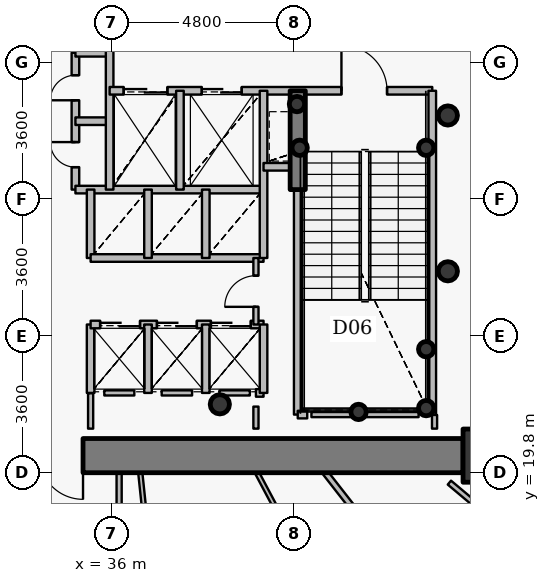
"""IFC4 building model, lengths in metres.
Left out: names, types, materials, properties, quantities, classifications, styles, units other than length and angle.
Written with IfcOpenShell. Run it as: python <this file> out.ifc"""

import sys

from ifc_helpers import new_model, si_unit, direction, frame, frame_2d, origin, origin_2d, place, context, subcontext, project, spatial, rectangle, hollow_circle, extrude, source, transform, mapped, element, fill, save


model = new_model("IFC4")
c1 = context("Model", 3, precision=1e-05, world=origin(), true_north=direction((0.0, 1.0)))
c2 = subcontext(c1, "Body", "Model", "MODEL_VIEW")
j1 = project(units=[si_unit("LENGTHUNIT", "METRE"), si_unit("PLANEANGLEUNIT", "RADIAN")], contexts=[c1])
p1 = place(None, origin())
s1 = spatial("IfcSite", under=j1, at=p1, CompositionType="ELEMENT")
p2 = place(p1, origin())
s2 = spatial("IfcBuilding", under=s1, at=p2, CompositionType="ELEMENT")
p3 = place(p2, frame((0.0, 0.0, 57.6)))
s3 = spatial("IfcBuildingStorey", under=s2, at=p3, CompositionType="ELEMENT", Elevation=57.6)
p4 = place(p3, frame((45.95, 20.25, 0.0), z_axis=(0.0, 0.0, 1.0), x_axis=(1.0, 0.0, 0.0)))
e1 = element("IfcColumn", 1, at=p4, inside=s3, PredefinedType="COLUMN", context=c2, shape_type="SweptSolid", body=[
    extrude(rectangle(XDim=1.4, YDim=1.4, at=origin_2d()), origin(), (0.0, 0.0, 1.0), 4.2),
])
p5 = place(p3, frame((38.85, 21.6, 0.0), z_axis=(0.0, 0.0, 1.0), x_axis=(1.0, 0.0, 0.0)))
e2 = element("IfcColumn", 2, at=p5, inside=s3, PredefinedType="COLUMN", context=c2, shape_type="SweptSolid", body=[
    extrude(hollow_circle(Radius=0.254, WallThickness=0.02, at=origin_2d()), origin(), (0.0, 0.0, 1.0), 4.2),
])
for number, where, z_axis, x_axis in (
    (3, (44.28, 21.5, 0.0), (0.0, 0.0, 1.0), (1.0, 0.0, 0.0)),
    (4, (44.28, 23.05, 0.0), (0.0, 0.0, 1.0), (1.0, 0.0, 0.0)),
    (5, (42.5, 21.4, 0.0), (0.0, 0.0, 1.0), (1.0, 0.0, 0.0)),
    (6, (40.95, 28.35, 0.0), (0.0, 0.0, 1.0), (1.0, 0.0, 0.0)),
    (7, (44.28, 28.35, 0.0), (0.0, 0.0, 1.0), (1.0, 0.0, 0.0)),
    (8, (40.88, 29.5, 0.0), (0.0, 0.0, 1.0), (1.0, 0.0, 0.0)),
):
    element("IfcColumn", number, at=place(p3, frame(where, z_axis=z_axis, x_axis=x_axis)), inside=s3, PredefinedType="COLUMN", context=c2, shape_type="SweptSolid", body=[
        extrude(hollow_circle(Radius=0.203, WallThickness=0.016, at=origin_2d()), origin(), (0.0, 0.0, 1.0), 4.2),
    ])
p6 = place(p3, frame((45.25, 20.25, 0.0), z_axis=(0.0, 0.0, 1.0), x_axis=(-1.0, 0.0, 0.0)))
e9 = element("IfcWall", 9, at=p6, inside=s3, PredefinedType="SHEAR", context=c2, shape_type="SweptSolid", body=[
    extrude(rectangle(XDim=18.5, YDim=0.9, at=frame_2d((9.25, 0.0))), origin(), (0.0, 0.0, 1.0), 3.4),
])
p7 = place(p6, frame((10.0, 0.0, 0.0)))
e10 = element("IfcOpeningElement", 10, at=p7, cuts=e9, PredefinedType="OPENING", context=c2, shape_type="SweptSolid", body=[
    extrude(rectangle(XDim=1.15, YDim=2.15, at=origin_2d()), frame((0.575, 0.46, 1.075), z_axis=(0.0, -1.0, 0.0), x_axis=(1.0, 0.0, 0.0)), (0.0, 0.0, 1.0), 0.92),
])
p8 = place(p3, frame((40.9, 27.25, 0.0), z_axis=(0.0, 0.0, 1.0), x_axis=(0.0, 1.0, 0.0)))
e11 = element("IfcWall", 11, at=p8, inside=s3, PredefinedType="SHEAR", context=c2, shape_type="SweptSolid", body=[
    extrude(rectangle(XDim=2.6, YDim=0.4, at=frame_2d((1.3, 0.0))), origin(), (0.0, 0.0, 1.0), 3.55),
])
for number, where, z_axis, x_axis in (
    (12, (44.85, 25.1, 0.0), (0.0, 0.0, 1.0), (1.0, 0.0, 0.0)),
    (13, (44.85, 29.2, 0.0), (0.0, 0.0, 1.0), (1.0, 0.0, 0.0)),
):
    element("IfcColumn", number, at=place(p3, frame(where, z_axis=z_axis, x_axis=x_axis)), inside=s3, PredefinedType="COLUMN", context=c2, shape_type="SweptSolid", body=[
        extrude(hollow_circle(Radius=0.254, WallThickness=0.02, at=origin_2d()), origin(), (0.0, 0.0, 1.0), 4.2),
    ])
p9 = place(p3, frame((35.05, 27.25, 0.0), z_axis=(0.0, 0.0, 1.0), x_axis=(0.0, 1.0, 0.0)))
e14 = element("IfcWall", 14, at=p9, inside=s3, PredefinedType="PARTITIONING", context=c2, shape_type="SweptSolid", body=[
    extrude(rectangle(XDim=3.6, YDim=0.2, at=frame_2d((1.8, 0.0))), origin(), (0.0, 0.0, 1.0), 3.95),
])
p10 = place(p9, frame((0.59, 0.0, 0.0)))
e15 = element("IfcOpeningElement", 15, at=p10, cuts=e14, PredefinedType="OPENING", context=c2, shape_type="SweptSolid", body=[
    extrude(rectangle(XDim=0.66, YDim=2.05, at=origin_2d()), frame((0.33, 0.11, 1.025), z_axis=(0.0, -1.0, 0.0), x_axis=(1.0, 0.0, 0.0)), (0.0, 0.0, 1.0), 0.22),
])
p11 = place(p9, frame((2.35, 0.0, 0.0)))
e16 = element("IfcOpeningElement", 16, at=p11, cuts=e14, PredefinedType="OPENING", context=c2, shape_type="SweptSolid", body=[
    extrude(rectangle(XDim=0.66, YDim=2.05, at=origin_2d()), frame((0.33, 0.11, 1.025), z_axis=(0.0, -1.0, 0.0), x_axis=(1.0, 0.0, 0.0)), (0.0, 0.0, 1.0), 0.22),
])
p12 = place(p3, frame((35.05, 27.25, 0.0), z_axis=(0.0, 0.0, 1.0), x_axis=(1.0, 0.0, 0.0)))
e17 = element("IfcWall", 17, at=p12, inside=s3, PredefinedType="PARTITIONING", context=c2, shape_type="SweptSolid", body=[
    extrude(rectangle(XDim=4.95, YDim=0.2, at=frame_2d((2.475, 0.0))), origin(), (0.0, 0.0, 1.0), 3.535),
])
for number, where, z_axis, x_axis in (
    (18, (35.05, 29.05, 0.0), (0.0, 0.0, 1.0), (1.0, 0.0, 0.0)),
    (19, (35.05, 30.85, 0.0), (0.0, 0.0, 1.0), (1.0, 0.0, 0.0)),
):
    element("IfcWall", number, at=place(p3, frame(where, z_axis=z_axis, x_axis=x_axis)), inside=s3, PredefinedType="PARTITIONING", context=c2, shape_type="SweptSolid", body=[
        extrude(rectangle(XDim=0.9, YDim=0.2, at=frame_2d((0.45, 0.0))), origin(), (0.0, 0.0, 1.0), 3.95),
    ])
p13 = place(p3, frame((35.45, 21.9, 0.0), z_axis=(0.0, 0.0, 1.0), x_axis=(0.0, 1.0, 0.0)))
e20 = element("IfcWall", 20, at=p13, inside=s3, PredefinedType="PARTITIONING", context=c2, shape_type="SweptSolid", body=[
    extrude(rectangle(XDim=1.8, YDim=0.2, at=frame_2d((0.9, 0.0))), origin(), (0.0, 0.0, 1.0), 3.95),
])
p14 = place(p3, frame((35.45, 23.7, 0.0), z_axis=(0.0, 0.0, 1.0), x_axis=(1.0, 0.0, 0.0)))
e21 = element("IfcWall", 21, at=p14, inside=s3, PredefinedType="PARTITIONING", context=c2, shape_type="SweptSolid", body=[
    extrude(rectangle(XDim=4.55, YDim=0.2, at=frame_2d((2.275, 0.0))), origin(), (0.0, 0.0, 1.0), 3.535),
])
p15 = place(p14, frame((0.25, 0.0, 0.0)))
e22 = element("IfcOpeningElement", 22, at=p15, cuts=e21, PredefinedType="OPENING", context=c2, shape_type="SweptSolid", body=[
    extrude(rectangle(XDim=1.05, YDim=2.15, at=origin_2d()), frame((0.525, 0.11, 1.075), z_axis=(0.0, -1.0, 0.0), x_axis=(1.0, 0.0, 0.0)), (0.0, 0.0, 1.0), 0.22),
])
p16 = place(p14, frame((1.745, 0.0, 0.0)))
e23 = element("IfcOpeningElement", 23, at=p16, cuts=e21, PredefinedType="OPENING", context=c2, shape_type="SweptSolid", body=[
    extrude(rectangle(XDim=1.05, YDim=2.15, at=origin_2d()), frame((0.525, 0.11, 1.075), z_axis=(0.0, -1.0, 0.0), x_axis=(1.0, 0.0, 0.0)), (0.0, 0.0, 1.0), 0.22),
])
p17 = place(p14, frame((3.165, 0.0, 0.0)))
e24 = element("IfcOpeningElement", 24, at=p17, cuts=e21, PredefinedType="OPENING", context=c2, shape_type="SweptSolid", body=[
    extrude(rectangle(XDim=1.05, YDim=2.15, at=origin_2d()), frame((0.525, 0.11, 1.075), z_axis=(0.0, -1.0, 0.0), x_axis=(1.0, 0.0, 0.0)), (0.0, 0.0, 1.0), 0.22),
])
p18 = place(p3, frame((35.45, 25.45, 0.0), z_axis=(0.0, 0.0, 1.0), x_axis=(0.0, 1.0, 0.0)))
e25 = element("IfcWall", 25, at=p18, inside=s3, PredefinedType="PARTITIONING", context=c2, shape_type="SweptSolid", body=[
    extrude(rectangle(XDim=1.8, YDim=0.2, at=frame_2d((0.9, 0.0))), origin(), (0.0, 0.0, 1.0), 3.95),
])
p19 = place(p3, frame((35.45, 25.45, 0.0), z_axis=(0.0, 0.0, 1.0), x_axis=(1.0, 0.0, 0.0)))
e26 = element("IfcWall", 26, at=p19, inside=s3, PredefinedType="PARTITIONING", context=c2, shape_type="SweptSolid", body=[
    extrude(rectangle(XDim=4.55, YDim=0.2, at=frame_2d((2.275, 0.0))), origin(), (0.0, 0.0, 1.0), 3.535),
])
p20 = place(p3, frame((35.95, 27.25, 0.0), z_axis=(0.0, 0.0, 1.0), x_axis=(0.0, 1.0, 0.0)))
e27 = element("IfcWall", 27, at=p20, inside=s3, PredefinedType="PARTITIONING", context=c2, shape_type="SweptSolid", body=[
    extrude(rectangle(XDim=3.8, YDim=0.2, at=frame_2d((1.9, 0.0))), origin(), (0.0, 0.0, 1.0), 3.95),
])
p21 = place(p3, frame((35.95, 29.85, 0.0), z_axis=(0.0, 0.0, 1.0), x_axis=(1.0, 0.0, 0.0)))
e28 = element("IfcWall", 28, at=p21, inside=s3, PredefinedType="PARTITIONING", context=c2, shape_type="SweptSolid", body=[
    extrude(rectangle(XDim=8.49, YDim=0.2, at=frame_2d((4.245, 0.0))), origin(), (0.0, 0.0, 1.0), 3.535),
])
p22 = place(p21, frame((6.1, 0.0, 0.0)))
e29 = element("IfcOpeningElement", 29, at=p22, cuts=e28, PredefinedType="OPENING", context=c2, shape_type="SweptSolid", body=[
    extrude(rectangle(XDim=1.2, YDim=2.15, at=origin_2d()), frame((0.6, 0.11, 1.075), z_axis=(0.0, -1.0, 0.0), x_axis=(1.0, 0.0, 0.0)), (0.0, 0.0, 1.0), 0.22),
])
p23 = place(p21, frame((0.37, 0.0, 0.0)))
e30 = element("IfcOpeningElement", 30, at=p23, cuts=e28, PredefinedType="OPENING", context=c2, shape_type="SweptSolid", body=[
    extrude(rectangle(XDim=1.15, YDim=2.15, at=origin_2d()), frame((0.575, 0.11, 1.075), z_axis=(0.0, -1.0, 0.0), x_axis=(1.0, 0.0, 0.0)), (0.0, 0.0, 1.0), 0.22),
])
p24 = place(p21, frame((2.425, 0.0, 0.0)))
e31 = element("IfcOpeningElement", 31, at=p24, cuts=e28, PredefinedType="OPENING", context=c2, shape_type="SweptSolid", body=[
    extrude(rectangle(XDim=1.05, YDim=2.15, at=origin_2d()), frame((0.525, 0.11, 1.075), z_axis=(0.0, -1.0, 0.0), x_axis=(1.0, 0.0, 0.0)), (0.0, 0.0, 1.0), 0.22),
])
p25 = place(p3, frame((36.2, 17.9, 0.0), z_axis=(0.0, 0.0, 1.0), x_axis=(0.0, 1.0, 0.0)))
e32 = element("IfcWall", 32, at=p25, inside=s3, PredefinedType="PARTITIONING", context=c2, shape_type="SweptSolid", body=[
    extrude(rectangle(XDim=1.9, YDim=0.135, at=frame_2d((0.95, 0.0))), origin(), (0.0, 0.0, 1.0), 3.285),
])
p26 = place(p3, frame((36.757, 19.8, 0.0), z_axis=(0.0, 0.0, 1.0), x_axis=(0.10451927992, -0.994522860534, 0.0)))
e33 = element("IfcWall", 33, at=p26, inside=s3, PredefinedType="MOVABLE", context=c2, shape_type="SweptSolid", body=[
    extrude(rectangle(XDim=17.047, YDim=0.11, at=frame_2d((8.523, 0.0))), origin(), (0.0, 0.0, 1.0), 3.335),
])
p27 = place(p26, frame((7.999, 0.0, 0.0)))
e34 = element("IfcOpeningElement", 34, at=p27, cuts=e33, PredefinedType="OPENING", context=c2, shape_type="SweptSolid", body=[
    extrude(rectangle(XDim=1.05, YDim=2.15, at=origin_2d()), frame((0.525, 0.065, 1.075), z_axis=(0.0, -1.0, 0.0), x_axis=(1.0, 0.0, 0.0)), (0.0, 0.0, 1.0), 0.13),
])
for number, where, z_axis, x_axis in (
    (35, (36.96, 21.9, 0.0), (0.0, 0.0, 1.0), (0.0, 1.0, 0.0)),
    (36, (36.96, 25.45, 0.0), (0.0, 0.0, 1.0), (0.0, 1.0, 0.0)),
):
    element("IfcWall", number, at=place(p3, frame(where, z_axis=z_axis, x_axis=x_axis)), inside=s3, PredefinedType="PARTITIONING", context=c2, shape_type="SweptSolid", body=[
        extrude(rectangle(XDim=1.8, YDim=0.2, at=frame_2d((0.9, 0.0))), origin(), (0.0, 0.0, 1.0), 3.95),
    ])
p28 = place(p3, frame((37.8, 27.25, 0.0), z_axis=(0.0, 0.0, 1.0), x_axis=(0.0, 1.0, 0.0)))
e37 = element("IfcWall", 37, at=p28, inside=s3, PredefinedType="PARTITIONING", context=c2, shape_type="SweptSolid", body=[
    extrude(rectangle(XDim=2.6, YDim=0.2, at=frame_2d((1.3, 0.0))), origin(), (0.0, 0.0, 1.0), 3.95),
])
for number, where, z_axis, x_axis in (
    (38, (38.48, 21.9, 0.0), (0.0, 0.0, 1.0), (0.0, 1.0, 0.0)),
    (39, (38.48, 25.45, 0.0), (0.0, 0.0, 1.0), (0.0, 1.0, 0.0)),
):
    element("IfcWall", number, at=place(p3, frame(where, z_axis=z_axis, x_axis=x_axis)), inside=s3, PredefinedType="PARTITIONING", context=c2, shape_type="SweptSolid", body=[
        extrude(rectangle(XDim=1.8, YDim=0.2, at=frame_2d((0.9, 0.0))), origin(), (0.0, 0.0, 1.0), 3.95),
    ])
p29 = place(p3, frame((39.8, 21.9, 0.0), z_axis=(0.0, 0.0, 1.0), x_axis=(1.0, 0.0, 0.0)))
e40 = element("IfcWall", 40, at=p29, inside=s3, PredefinedType="PARTITIONING", context=c2, shape_type="SweptSolid", body=[
    extrude(rectangle(XDim=0.2, YDim=0.2, at=frame_2d((0.1, 0.0))), origin(), (0.0, 0.0, 1.0), 3.95),
])
p30 = place(p3, frame((39.8, 23.7, 0.0), z_axis=(0.0, 0.0, 1.0), x_axis=(0.0, 1.0, 0.0)))
e41 = element("IfcWall", 41, at=p30, inside=s3, PredefinedType="PARTITIONING", context=c2, shape_type="SweptSolid", body=[
    extrude(rectangle(XDim=1.75, YDim=0.135, at=frame_2d((0.875, 0.0))), origin(), (0.0, 0.0, 1.0), 3.95),
])
p31 = place(p30, frame((0.465, 0.0, 0.0)))
e42 = element("IfcOpeningElement", 42, at=p31, cuts=e41, PredefinedType="OPENING", context=c2, shape_type="SweptSolid", body=[
    extrude(rectangle(XDim=0.82, YDim=2.1, at=origin_2d()), frame((0.41, 0.078, 1.05), z_axis=(0.0, -1.0, 0.0), x_axis=(1.0, 0.0, 0.0)), (0.0, 0.0, 1.0), 0.155),
])
p32 = place(p3, frame((39.828, 19.8, 0.0), z_axis=(0.0, 0.0, 1.0), x_axis=(0.469475400737, -0.882945552174, 0.0)))
e43 = element("IfcWall", 43, at=p32, inside=s3, PredefinedType="MOVABLE", context=c2, shape_type="SweptSolid", body=[
    extrude(rectangle(XDim=17.188, YDim=0.11, at=frame_2d((8.594, 0.0))), origin(), (0.0, 0.0, 1.0), 3.335),
])
p33 = place(p32, frame((8.069, 0.0, 0.0)))
e44 = element("IfcOpeningElement", 44, at=p33, cuts=e43, PredefinedType="OPENING", context=c2, shape_type="SweptSolid", body=[
    extrude(rectangle(XDim=1.05, YDim=2.15, at=origin_2d()), frame((0.525, 0.065, 1.075), z_axis=(0.0, -1.0, 0.0), x_axis=(1.0, 0.0, 0.0)), (0.0, 0.0, 1.0), 0.13),
])
p34 = place(p3, frame((40.0, 21.9, 0.0), z_axis=(0.0, 0.0, 1.0), x_axis=(0.0, 1.0, 0.0)))
e45 = element("IfcWall", 45, at=p34, inside=s3, PredefinedType="PARTITIONING", context=c2, shape_type="SweptSolid", body=[
    extrude(rectangle(XDim=1.8, YDim=0.2, at=frame_2d((0.9, 0.0))), origin(), (0.0, 0.0, 1.0), 3.95),
])
p35 = place(p3, frame((40.0, 25.45, 0.0), z_axis=(0.0, 0.0, 1.0), x_axis=(0.0, 1.0, 0.0)))
e46 = element("IfcWall", 46, at=p35, inside=s3, PredefinedType="PARTITIONING", context=c2, shape_type="SweptSolid", body=[
    extrude(rectangle(XDim=4.4, YDim=0.2, at=frame_2d((2.2, 0.0))), origin(), (0.0, 0.0, 1.0), 3.95),
])
p36 = place(p3, frame((40.0, 27.85, 0.0), z_axis=(0.0, 0.0, 1.0), x_axis=(1.0, 0.0, 0.0)))
e47 = element("IfcWall", 47, at=p36, inside=s3, PredefinedType="PARTITIONING", context=c2, shape_type="SweptSolid", body=[
    extrude(rectangle(XDim=0.9, YDim=0.2, at=frame_2d((0.45, 0.0))), origin(), (0.0, 0.0, 1.0), 3.95),
])
p37 = place(p3, frame((40.9, 21.33, 0.0), z_axis=(0.0, 0.0, 1.0), x_axis=(0.0, 1.0, 0.0)))
e48 = element("IfcWall", 48, at=p37, inside=s3, PredefinedType="PARTITIONING", context=c2, shape_type="SweptSolid", body=[
    extrude(rectangle(XDim=5.91, YDim=0.2, at=frame_2d((2.955, 0.0))), origin(), (0.0, 0.0, 1.0), 3.485),
])
p38 = place(p3, frame((40.9, 21.33, 0.0), z_axis=(0.0, 0.0, 1.0), x_axis=(1.0, 0.0, 0.0)))
e49 = element("IfcWall", 49, at=p38, inside=s3, PredefinedType="PARTITIONING", context=c2, shape_type="SweptSolid", body=[
    extrude(rectangle(XDim=0.25, YDim=0.2, at=frame_2d((0.125, 0.0))), origin(), (0.0, 0.0, 1.0), 3.485),
])
p39 = place(p3, frame((41.625, 19.8, 0.0), z_axis=(0.0, 0.0, 1.0), x_axis=(0.615654567116, -0.788016150843, 0.0)))
e50 = element("IfcWall", 50, at=p39, inside=s3, PredefinedType="PARTITIONING", context=c2, shape_type="SweptSolid", body=[
    extrude(rectangle(XDim=17.105, YDim=0.15, at=frame_2d((8.552, 0.0))), origin(), (0.0, 0.0, 1.0), 3.335),
])
p40 = place(p3, frame((44.44, 21.33, 0.0), z_axis=(0.0, 0.0, 1.0), x_axis=(0.0, 1.0, 0.0)))
e51 = element("IfcWall", 51, at=p40, inside=s3, PredefinedType="PARTITIONING", context=c2, shape_type="SweptSolid", body=[
    extrude(rectangle(XDim=8.52, YDim=0.2, at=frame_2d((4.26, 0.0))), origin(), (0.0, 0.0, 1.0), 3.95),
])
p41 = place(p3, frame((44.08, 21.33, 0.0), z_axis=(0.0, 0.0, 1.0), x_axis=(-1.0, 0.0, 0.0)))
e52 = element("IfcWall", 52, at=p41, inside=s3, PredefinedType="PARTITIONING", context=c2, shape_type="SweptSolid", body=[
    extrude(rectangle(XDim=2.82, YDim=0.135, at=frame_2d((1.41, 0.0))), origin(), (0.0, 0.0, 1.0), 3.485),
])
p42 = place(p3, frame((36.6, 21.9, 0.0), z_axis=(0.0, 0.0, 1.0), x_axis=(-1.0, 0.0, 0.0)))
e53 = element("IfcWall", 53, at=p42, inside=s3, PredefinedType="PARTITIONING", context=c2, shape_type="SweptSolid", body=[
    extrude(rectangle(XDim=0.79, YDim=0.135, at=frame_2d((0.395, 0.0))), origin(), (0.0, 0.0, 1.0), 3.95),
])
p43 = place(p3, frame((38.12, 21.9, 0.0), z_axis=(0.0, 0.0, 1.0), x_axis=(-1.0, 0.0, 0.0)))
e54 = element("IfcWall", 54, at=p43, inside=s3, PredefinedType="PARTITIONING", context=c2, shape_type="SweptSolid", body=[
    extrude(rectangle(XDim=0.8, YDim=0.135, at=frame_2d((0.4, 0.0))), origin(), (0.0, 0.0, 1.0), 3.95),
])
p44 = place(p3, frame((39.64, 21.9, 0.0), z_axis=(0.0, 0.0, 1.0), x_axis=(-1.0, 0.0, 0.0)))
e55 = element("IfcWall", 55, at=p44, inside=s3, PredefinedType="PARTITIONING", context=c2, shape_type="SweptSolid", body=[
    extrude(rectangle(XDim=0.8, YDim=0.135, at=frame_2d((0.4, 0.0))), origin(), (0.0, 0.0, 1.0), 3.535),
])
p45 = place(p3, frame((39.8, 20.96, 0.0), z_axis=(0.0, 0.0, 1.0), x_axis=(0.0, 1.0, 0.0)))
e56 = element("IfcWall", 56, at=p45, inside=s3, PredefinedType="PARTITIONING", context=c2, shape_type="SweptSolid", body=[
    extrude(rectangle(XDim=0.58, YDim=0.135, at=frame_2d((0.29, 0.0))), origin(), (0.0, 0.0, 1.0), 3.485),
])
p46 = place(p3, frame((44.5, 20.96, 0.0), z_axis=(0.0, 0.0, 1.0), x_axis=(0.0, 1.0, 0.0)))
e57 = element("IfcWall", 57, at=p46, inside=s3, PredefinedType="PARTITIONING", context=c2, shape_type="SweptSolid", body=[
    extrude(rectangle(XDim=0.36, YDim=0.135, at=frame_2d((0.18, 0.0))), origin(), (0.0, 0.0, 1.0), 3.95),
])
p47 = place(p3, frame((35.45, 21.89, 0.0), z_axis=(0.0, 0.0, 1.0), x_axis=(0.0, -1.0, 0.0)))
e58 = element("IfcWall", 58, at=p47, inside=s3, PredefinedType="PARTITIONING", context=c2, shape_type="SweptSolid", body=[
    extrude(rectangle(XDim=0.93, YDim=0.135, at=frame_2d((0.465, 0.0))), origin(), (0.0, 0.0, 1.0), 3.535),
])
p48 = place(p3, frame((44.89, 19.54, 0.0), z_axis=(0.0, 0.0, 1.0), x_axis=(0.76598583339, -0.642857451576, 0.0)))
e59 = element("IfcWall", 59, at=p48, inside=s3, PredefinedType="PARTITIONING", context=c2, shape_type="SweptSolid", body=[
    extrude(rectangle(XDim=1.112, YDim=0.135, at=frame_2d((0.556, 0.0))), origin(), (0.0, 0.0, 1.0), 3.95),
])
m1 = source(origin(), c2, "Body", "SweptSolid", [
    extrude(rectangle(XDim=1.15, YDim=2.15, at=origin_2d()), frame((0.575, 0.025, 1.075), z_axis=(0.0, -1.0, 0.0), x_axis=(1.0, 0.0, 0.0)), (0.0, 0.0, 1.0), 0.05),
])
p49 = place(p7, origin())
e60 = element("IfcDoor", 60, at=p49, inside=s3, OperationType="SINGLE_SWING_LEFT", PredefinedType="DOOR", context=c2, shape_type="MappedRepresentation", body=[
    mapped(m1, transform((0.0, 0.0, 0.0), x_axis=(1.0, 0.0, 0.0), y_axis=(0.0, 1.0, 0.0), z_axis=(0.0, 0.0, 1.0), scale=1.0)),
])
fill(e10, e60)
m2 = source(origin(), c2, "Body", "SweptSolid", [
    extrude(rectangle(XDim=1.2, YDim=2.15, at=origin_2d()), frame((0.6, 0.025, 1.075), z_axis=(0.0, -1.0, 0.0), x_axis=(1.0, 0.0, 0.0)), (0.0, 0.0, 1.0), 0.05),
])
p50 = place(p22, origin())
e61 = element("IfcDoor", 61, at=p50, inside=s3, OperationType="SINGLE_SWING_LEFT", PredefinedType="DOOR", context=c2, shape_type="MappedRepresentation", body=[
    mapped(m2, transform((0.0, 0.0, 0.0), x_axis=(1.0, 0.0, 0.0), y_axis=(0.0, 1.0, 0.0), z_axis=(0.0, 0.0, 1.0), scale=1.0)),
])
fill(e29, e61)
m3 = source(origin(), c2, "Body", "SweptSolid", [
    extrude(rectangle(XDim=1.15, YDim=2.15, at=origin_2d()), frame((0.575, 0.025, 1.075), z_axis=(0.0, -1.0, 0.0), x_axis=(1.0, 0.0, 0.0)), (0.0, 0.0, 1.0), 0.05),
])
p51 = place(p23, origin())
e62 = element("IfcDoor", 62, at=p51, inside=s3, OperationType="DOUBLE_DOOR_SLIDING", PredefinedType="USERDEFINED", context=c2, shape_type="MappedRepresentation", body=[
    mapped(m3, transform((0.0, 0.0, 0.0), x_axis=(1.0, 0.0, 0.0), y_axis=(0.0, 1.0, 0.0), z_axis=(0.0, 0.0, 1.0), scale=1.0)),
])
fill(e30, e62)
m4 = source(origin(), c2, "Body", "SweptSolid", [
    extrude(rectangle(XDim=1.05, YDim=2.15, at=origin_2d()), frame((0.525, 0.025, 1.075), z_axis=(0.0, -1.0, 0.0), x_axis=(1.0, 0.0, 0.0)), (0.0, 0.0, 1.0), 0.05),
])
p52 = place(p24, origin())
e63 = element("IfcDoor", 63, at=p52, inside=s3, OperationType="DOUBLE_DOOR_SLIDING", PredefinedType="USERDEFINED", context=c2, shape_type="MappedRepresentation", body=[
    mapped(m4, transform((0.0, 0.0, 0.0), x_axis=(1.0, 0.0, 0.0), y_axis=(0.0, 1.0, 0.0), z_axis=(0.0, 0.0, 1.0), scale=1.0)),
])
fill(e31, e63)
p53 = place(p15, origin())
e64 = element("IfcDoor", 64, at=p53, inside=s3, OperationType="DOUBLE_DOOR_SLIDING", PredefinedType="USERDEFINED", context=c2, shape_type="MappedRepresentation", body=[
    mapped(m4, transform((0.0, 0.0, 0.0), x_axis=(1.0, 0.0, 0.0), y_axis=(0.0, 1.0, 0.0), z_axis=(0.0, 0.0, 1.0), scale=1.0)),
])
fill(e22, e64)
p54 = place(p16, origin())
e65 = element("IfcDoor", 65, at=p54, inside=s3, OperationType="DOUBLE_DOOR_SLIDING", PredefinedType="USERDEFINED", context=c2, shape_type="MappedRepresentation", body=[
    mapped(m4, transform((0.0, 0.0, 0.0), x_axis=(1.0, 0.0, 0.0), y_axis=(0.0, 1.0, 0.0), z_axis=(0.0, 0.0, 1.0), scale=1.0)),
])
fill(e23, e65)
p55 = place(p17, origin())
e66 = element("IfcDoor", 66, at=p55, inside=s3, OperationType="DOUBLE_DOOR_SLIDING", PredefinedType="USERDEFINED", context=c2, shape_type="MappedRepresentation", body=[
    mapped(m4, transform((0.0, 0.0, 0.0), x_axis=(1.0, 0.0, 0.0), y_axis=(0.0, 1.0, 0.0), z_axis=(0.0, 0.0, 1.0), scale=1.0)),
])
fill(e24, e66)
m5 = source(origin(), c2, "Body", "SweptSolid", [
    extrude(rectangle(XDim=0.66, YDim=2.05, at=origin_2d()), frame((0.33, 0.025, 1.025), z_axis=(0.0, -1.0, 0.0), x_axis=(1.0, 0.0, 0.0)), (0.0, 0.0, 1.0), 0.05),
])
p56 = place(p10, origin())
e67 = element("IfcDoor", 67, at=p56, inside=s3, OperationType="SINGLE_SWING_RIGHT", PredefinedType="USERDEFINED", context=c2, shape_type="MappedRepresentation", body=[
    mapped(m5, transform((0.0, 0.0, 0.0), x_axis=(1.0, 0.0, 0.0), y_axis=(0.0, 1.0, 0.0), z_axis=(0.0, 0.0, 1.0), scale=1.0)),
])
fill(e15, e67)
p57 = place(p11, origin())
e68 = element("IfcDoor", 68, at=p57, inside=s3, OperationType="SINGLE_SWING_LEFT", PredefinedType="USERDEFINED", context=c2, shape_type="MappedRepresentation", body=[
    mapped(m5, transform((0.0, 0.0, 0.0), x_axis=(1.0, 0.0, 0.0), y_axis=(0.0, 1.0, 0.0), z_axis=(0.0, 0.0, 1.0), scale=1.0)),
])
fill(e16, e68)
m6 = source(origin(), c2, "Body", "SweptSolid", [
    extrude(rectangle(XDim=0.82, YDim=2.1, at=origin_2d()), frame((0.41, 0.025, 1.05), z_axis=(0.0, -1.0, 0.0), x_axis=(1.0, 0.0, 0.0)), (0.0, 0.0, 1.0), 0.05),
])
p58 = place(p31, origin())
e69 = element("IfcDoor", 69, at=p58, inside=s3, OperationType="SINGLE_SWING_LEFT", PredefinedType="DOOR", context=c2, shape_type="MappedRepresentation", body=[
    mapped(m6, transform((0.0, 0.0, 0.0), x_axis=(1.0, 0.0, 0.0), y_axis=(0.0, 1.0, 0.0), z_axis=(0.0, 0.0, 1.0), scale=1.0)),
])
fill(e42, e69)
save(model, sys.argv[1])
